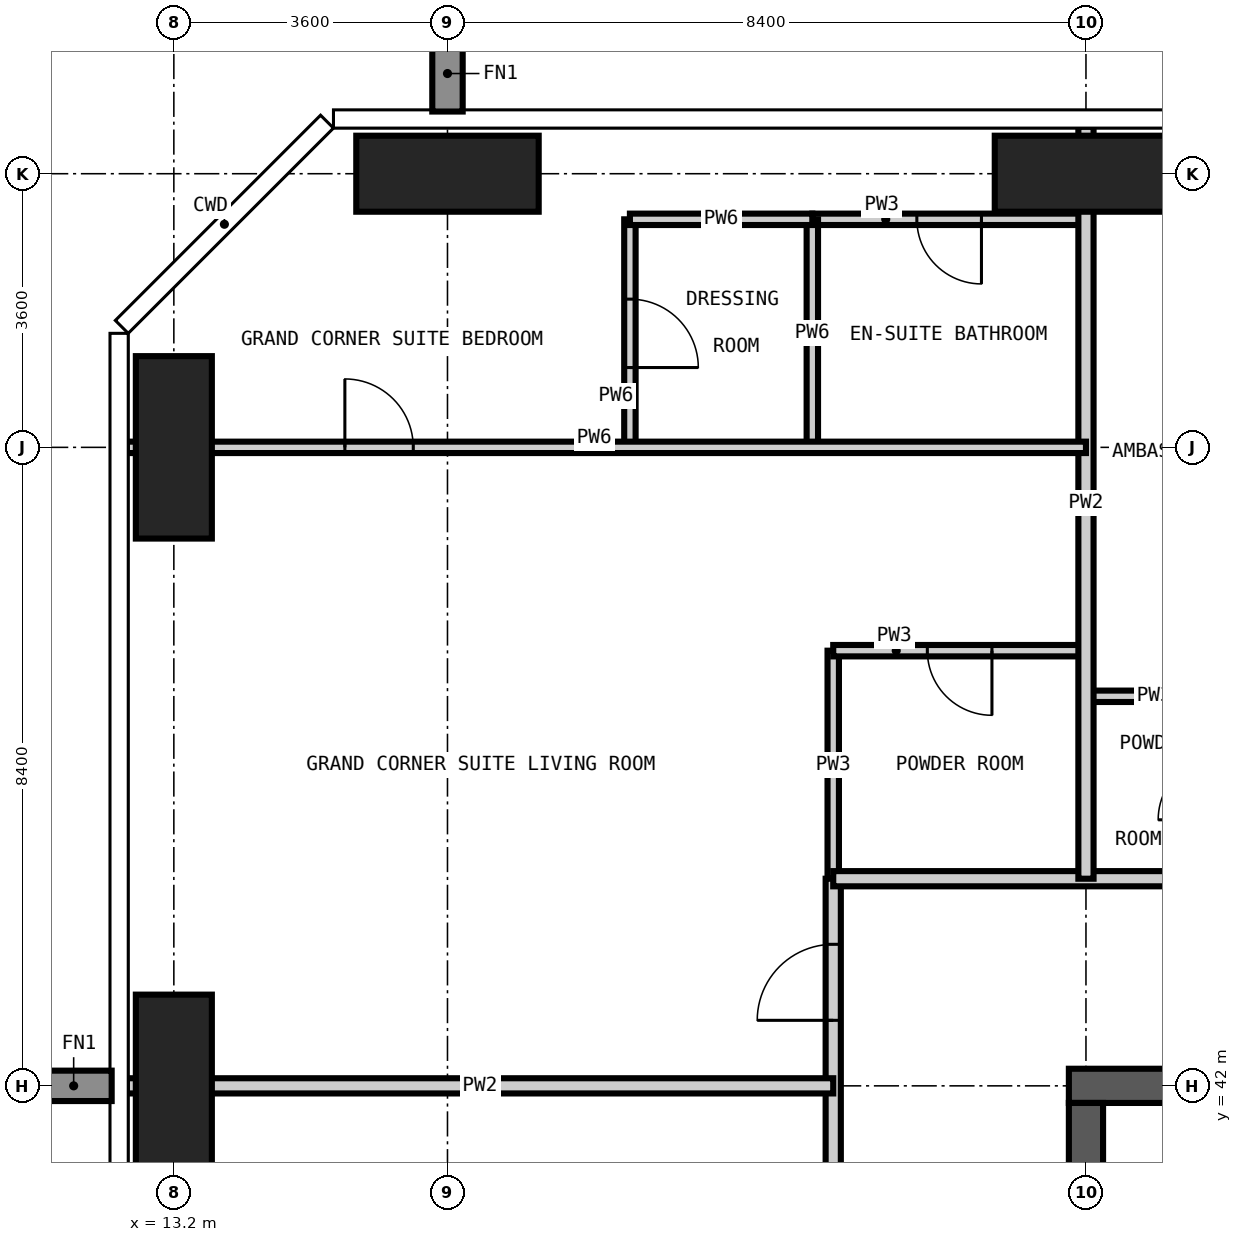
"""IFC4 building model, lengths in metres.
Left out: names, types, materials, properties, quantities, classifications, styles, units other than length and angle.
Written with IfcOpenShell. Run it as: python <this file> out.ifc"""

import sys

from ifc_helpers import new_model, si_unit, direction, frame, frame_2d, origin, origin_2d, place, context, subcontext, project, spatial, rectangle, extrude, element, fill, save


model = new_model("IFC4")
c1 = context("Model", 3, precision=1e-05, world=origin(), true_north=direction((0.0, 1.0)))
c2 = subcontext(c1, "Body", "Model", "MODEL_VIEW")
j1 = project(units=[si_unit("LENGTHUNIT", "METRE"), si_unit("PLANEANGLEUNIT", "RADIAN")], contexts=[c1])
p1 = place(None, origin())
s1 = spatial("IfcSite", under=j1, at=p1, CompositionType="ELEMENT")
p2 = place(p1, origin())
s2 = spatial("IfcBuilding", under=s1, at=p2, CompositionType="ELEMENT")
p3 = place(p2, frame((0.0, 0.0, 241.2)))
s3 = spatial("IfcBuildingStorey", under=s2, at=p3, CompositionType="ELEMENT", Elevation=241.2)
for number, where, z_axis, x_axis in (
    (1, (13.2, 42.0, -0.35), (0.0, 0.0, 1.0), (1.0, 0.0, 0.0)),
    (2, (13.2, 50.4, -0.35), (0.0, 0.0, 1.0), (1.0, 0.0, 0.0)),
):
    element("IfcColumn", number, at=place(p3, frame(where, z_axis=z_axis, x_axis=x_axis)), inside=s3, PredefinedType="COLUMN", context=c2, shape_type="SweptSolid", body=[
        extrude(rectangle(XDim=1.0, YDim=2.4, at=origin_2d()), origin(), (0.0, 0.0, 1.0), 3.9),
    ])
for number, where, z_axis, x_axis in (
    (3, (16.8, 54.0, -0.35), (0.0, 0.0, 1.0), (1.0, 0.0, 0.0)),
    (4, (25.2, 54.0, -0.35), (0.0, 0.0, 1.0), (1.0, 0.0, 0.0)),
):
    element("IfcColumn", number, at=place(p3, frame(where, z_axis=z_axis, x_axis=x_axis)), inside=s3, PredefinedType="COLUMN", context=c2, shape_type="SweptSolid", body=[
        extrude(rectangle(XDim=2.4, YDim=1.0, at=origin_2d()), origin(), (0.0, 0.0, 1.0), 3.9),
    ])
p4 = place(p3, frame((42.225, 42.0, -0.35), z_axis=(0.0, 0.0, 1.0), x_axis=(-1.0, 0.0, 0.0)))
e5 = element("IfcWall", 5, at=p4, inside=s3, PredefinedType="SHEAR", context=c2, shape_type="SweptSolid", body=[
    extrude(rectangle(XDim=17.25, YDim=0.45, at=frame_2d((8.625, 0.0))), origin(), (0.0, 0.0, 1.0), 3.9),
])
p5 = place(p4, frame((10.125, 0.0, 0.35)))
e6 = element("IfcOpeningElement", 6, at=p5, cuts=e5, PredefinedType="OPENING", context=c2, shape_type="SweptSolid", body=[
    extrude(rectangle(XDim=1.2, YDim=2.2, at=frame_2d((0.6, 1.1))), frame((0.0, 0.235, 0.0), z_axis=(0.0, -1.0, 0.0), x_axis=(1.0, 0.0, 0.0)), (0.0, 0.0, 1.0), 0.47),
])
p6 = place(p3, frame((25.2, 41.775, -0.35), z_axis=(0.0, 0.0, 1.0), x_axis=(0.0, -1.0, 0.0)))
e7 = element("IfcWall", 7, at=p6, inside=s3, PredefinedType="SHEAR", context=c2, shape_type="SweptSolid", body=[
    extrude(rectangle(XDim=24.75, YDim=0.45, at=frame_2d((12.375, 0.0))), origin(), (0.0, 0.0, 1.0), 3.9),
])
p7 = place(p6, frame((11.875, 0.0, 0.35)))
e8 = element("IfcOpeningElement", 8, at=p7, cuts=e7, PredefinedType="OPENING", context=c2, shape_type="SweptSolid", body=[
    extrude(rectangle(XDim=1.0, YDim=2.1, at=frame_2d((0.5, 1.05))), frame((0.0, 0.235, 0.0), z_axis=(0.0, -1.0, 0.0), x_axis=(1.0, 0.0, 0.0)), (0.0, 0.0, 1.0), 0.47),
])
p8 = place(p3, frame((21.875, 44.725, 0.0), z_axis=(0.0, 0.0, 1.0), x_axis=(0.0, 1.0, 0.0)))
e9 = element("IfcWall", 9, at=p8, inside=s3, PredefinedType="PARTITIONING", context=c2, shape_type="SweptSolid", body=[
    extrude(rectangle(XDim=3.0, YDim=0.15, at=frame_2d((1.5, 0.0))), origin(), (0.0, 0.0, 1.0), 3.55),
])
p9 = place(p3, frame((25.2, 47.125, 0.0), z_axis=(0.0, 0.0, 1.0), x_axis=(1.0, 0.0, 0.0)))
e10 = element("IfcWall", 10, at=p9, inside=s3, PredefinedType="PARTITIONING", context=c2, shape_type="SweptSolid", body=[
    extrude(rectangle(XDim=1.8, YDim=0.15, at=frame_2d((0.9, 0.0))), origin(), (0.0, 0.0, 1.0), 3.55),
])
p10 = place(p3, frame((21.875, 47.725, 0.0), z_axis=(0.0, 0.0, 1.0), x_axis=(1.0, 0.0, 0.0)))
e11 = element("IfcWall", 11, at=p10, inside=s3, PredefinedType="PARTITIONING", context=c2, shape_type="SweptSolid", body=[
    extrude(rectangle(XDim=3.325, YDim=0.15, at=frame_2d((1.663, 0.0))), origin(), (0.0, 0.0, 1.0), 3.55),
])
p11 = place(p10, frame((1.238, 0.0, 0.0)))
e12 = element("IfcOpeningElement", 12, at=p11, cuts=e11, PredefinedType="OPENING", context=c2, shape_type="SweptSolid", body=[
    extrude(rectangle(XDim=0.85, YDim=2.1, at=frame_2d((0.425, 1.05))), frame((0.0, 0.085, 0.0), z_axis=(0.0, -1.0, 0.0), x_axis=(1.0, 0.0, 0.0)), (0.0, 0.0, 1.0), 0.17),
])
p12 = place(p3, frame((21.6, 53.4, 0.0), z_axis=(0.0, 0.0, 1.0), x_axis=(1.0, 0.0, 0.0)))
e13 = element("IfcWall", 13, at=p12, inside=s3, PredefinedType="PARTITIONING", context=c2, shape_type="SweptSolid", body=[
    extrude(rectangle(XDim=3.6, YDim=0.15, at=frame_2d((1.8, 0.0))), origin(), (0.0, 0.0, 1.0), 3.55),
])
p13 = place(p12, frame((1.375, 0.0, 0.0)))
e14 = element("IfcOpeningElement", 14, at=p13, cuts=e13, PredefinedType="OPENING", context=c2, shape_type="SweptSolid", body=[
    extrude(rectangle(XDim=0.85, YDim=2.1, at=frame_2d((0.425, 1.05))), frame((0.0, 0.085, 0.0), z_axis=(0.0, -1.0, 0.0), x_axis=(1.0, 0.0, 0.0)), (0.0, 0.0, 1.0), 0.17),
])
p14 = place(p3, frame((21.875, 13.475, 0.0), z_axis=(0.0, 0.0, 1.0), x_axis=(0.0, 1.0, 0.0)))
e15 = element("IfcWall", 15, at=p14, inside=s3, PredefinedType="PARTITIONING", context=c2, shape_type="SweptSolid", body=[
    extrude(rectangle(XDim=31.25, YDim=0.2, at=frame_2d((15.625, 0.0))), origin(), (0.0, 0.0, 1.0), 3.55),
])
p15 = place(p14, frame((7.025, 0.0, 0.0)))
e16 = element("IfcOpeningElement", 16, at=p15, cuts=e15, PredefinedType="OPENING", context=c2, shape_type="SweptSolid", body=[
    extrude(rectangle(XDim=1.0, YDim=2.2, at=frame_2d((0.5, 1.1))), frame((0.0, 0.11, 0.0), z_axis=(0.0, -1.0, 0.0), x_axis=(1.0, 0.0, 0.0)), (0.0, 0.0, 1.0), 0.22),
])
p16 = place(p14, frame((15.425, 0.0, 0.0)))
e17 = element("IfcOpeningElement", 17, at=p16, cuts=e15, PredefinedType="OPENING", context=c2, shape_type="SweptSolid", body=[
    extrude(rectangle(XDim=1.0, YDim=2.2, at=frame_2d((0.5, 1.1))), frame((0.0, 0.11, 0.0), z_axis=(0.0, -1.0, 0.0), x_axis=(1.0, 0.0, 0.0)), (0.0, 0.0, 1.0), 0.22),
])
p17 = place(p14, frame((23.825, 0.0, 0.0)))
e18 = element("IfcOpeningElement", 18, at=p17, cuts=e15, PredefinedType="OPENING", context=c2, shape_type="SweptSolid", body=[
    extrude(rectangle(XDim=1.0, YDim=2.2, at=frame_2d((0.5, 1.1))), frame((0.0, 0.11, 0.0), z_axis=(0.0, -1.0, 0.0), x_axis=(1.0, 0.0, 0.0)), (0.0, 0.0, 1.0), 0.22),
])
p18 = place(p14, frame((1.162, 0.0, 0.0)))
e19 = element("IfcOpeningElement", 19, at=p18, cuts=e15, PredefinedType="OPENING", context=c2, shape_type="SweptSolid", body=[
    extrude(rectangle(XDim=1.0, YDim=2.2, at=frame_2d((0.5, 1.1))), frame((0.0, 0.11, 0.0), z_axis=(0.0, -1.0, 0.0), x_axis=(1.0, 0.0, 0.0)), (0.0, 0.0, 1.0), 0.22),
])
p19 = place(p14, frame((29.387, 0.0, 0.0)))
e20 = element("IfcOpeningElement", 20, at=p19, cuts=e15, PredefinedType="OPENING", context=c2, shape_type="SweptSolid", body=[
    extrude(rectangle(XDim=1.0, YDim=2.2, at=frame_2d((0.5, 1.1))), frame((0.0, 0.11, 0.0), z_axis=(0.0, -1.0, 0.0), x_axis=(1.0, 0.0, 0.0)), (0.0, 0.0, 1.0), 0.22),
])
p20 = place(p3, frame((21.875, 44.725, 0.0), z_axis=(0.0, 0.0, 1.0), x_axis=(1.0, 0.0, 0.0)))
e21 = element("IfcWall", 21, at=p20, inside=s3, PredefinedType="PARTITIONING", context=c2, shape_type="SweptSolid", body=[
    extrude(rectangle(XDim=22.25, YDim=0.2, at=frame_2d((11.125, 0.0))), origin(), (0.0, 0.0, 1.0), 3.55),
])
p21 = place(p20, frame((5.825, 0.0, 0.0)))
e22 = element("IfcOpeningElement", 22, at=p21, cuts=e21, PredefinedType="OPENING", context=c2, shape_type="SweptSolid", body=[
    extrude(rectangle(XDim=1.0, YDim=2.2, at=frame_2d((0.5, 1.1))), frame((0.0, 0.11, 0.0), z_axis=(0.0, -1.0, 0.0), x_axis=(1.0, 0.0, 0.0)), (0.0, 0.0, 1.0), 0.22),
])
p22 = place(p20, frame((17.525, 0.0, 0.0)))
e23 = element("IfcOpeningElement", 23, at=p22, cuts=e21, PredefinedType="OPENING", context=c2, shape_type="SweptSolid", body=[
    extrude(rectangle(XDim=1.0, YDim=2.1, at=frame_2d((0.5, 1.05))), frame((0.0, 0.11, 0.0), z_axis=(0.0, -1.0, 0.0), x_axis=(1.0, 0.0, 0.0)), (0.0, 0.0, 1.0), 0.22),
])
p23 = place(p3, frame((25.2, 44.725, 0.0), z_axis=(0.0, 0.0, 1.0), x_axis=(0.0, 1.0, 0.0)))
e24 = element("IfcWall", 24, at=p23, inside=s3, PredefinedType="PARTITIONING", context=c2, shape_type="SweptSolid", body=[
    extrude(rectangle(XDim=9.893, YDim=0.2, at=frame_2d((4.946, 0.0))), origin(), (0.0, 0.0, 1.0), 3.55),
])
p24 = place(p3, frame((12.582, 42.0, 0.0), z_axis=(0.0, 0.0, 1.0), x_axis=(1.0, 0.0, 0.0)))
e25 = element("IfcWall", 25, at=p24, inside=s3, PredefinedType="PARTITIONING", context=c2, shape_type="SweptSolid", body=[
    extrude(rectangle(XDim=9.293, YDim=0.2, at=frame_2d((4.646, 0.0))), origin(), (0.0, 0.0, 1.0), 3.55),
])
p25 = place(p3, frame((19.2, 50.4, 0.0), z_axis=(0.0, 0.0, 1.0), x_axis=(0.0, 1.0, 0.0)))
e26 = element("IfcWall", 26, at=p25, inside=s3, PredefinedType="PARTITIONING", context=c2, shape_type="SweptSolid", body=[
    extrude(rectangle(XDim=3.0, YDim=0.15, at=frame_2d((1.5, 0.0))), origin(), (0.0, 0.0, 1.0), 3.55),
])
p26 = place(p25, frame((1.05, 0.0, 0.0)))
e27 = element("IfcOpeningElement", 27, at=p26, cuts=e26, PredefinedType="OPENING", context=c2, shape_type="SweptSolid", body=[
    extrude(rectangle(XDim=0.9, YDim=2.1, at=frame_2d((0.45, 1.05))), frame((0.0, 0.085, 0.0), z_axis=(0.0, -1.0, 0.0), x_axis=(1.0, 0.0, 0.0)), (0.0, 0.0, 1.0), 0.17),
])
p27 = place(p3, frame((21.6, 50.4, 0.0), z_axis=(0.0, 0.0, 1.0), x_axis=(0.0, 1.0, 0.0)))
e28 = element("IfcWall", 28, at=p27, inside=s3, PredefinedType="PARTITIONING", context=c2, shape_type="SweptSolid", body=[
    extrude(rectangle(XDim=3.0, YDim=0.15, at=frame_2d((1.5, 0.0))), origin(), (0.0, 0.0, 1.0), 3.55),
])
p28 = place(p3, frame((12.582, 50.4, 0.0), z_axis=(0.0, 0.0, 1.0), x_axis=(1.0, 0.0, 0.0)))
e29 = element("IfcWall", 29, at=p28, inside=s3, PredefinedType="PARTITIONING", context=c2, shape_type="SweptSolid", body=[
    extrude(rectangle(XDim=12.618, YDim=0.15, at=frame_2d((6.309, 0.0))), origin(), (0.0, 0.0, 1.0), 3.55),
])
p29 = place(p28, frame((2.868, 0.0, 0.0)))
e30 = element("IfcOpeningElement", 30, at=p29, cuts=e29, PredefinedType="OPENING", context=c2, shape_type="SweptSolid", body=[
    extrude(rectangle(XDim=0.9, YDim=2.1, at=frame_2d((0.45, 1.05))), frame((0.0, 0.085, 0.0), z_axis=(0.0, -1.0, 0.0), x_axis=(1.0, 0.0, 0.0)), (0.0, 0.0, 1.0), 0.17),
])
p30 = place(p3, frame((19.2, 53.4, 0.0), z_axis=(0.0, 0.0, 1.0), x_axis=(1.0, 0.0, 0.0)))
e31 = element("IfcWall", 31, at=p30, inside=s3, PredefinedType="PARTITIONING", context=c2, shape_type="SweptSolid", body=[
    extrude(rectangle(XDim=2.4, YDim=0.15, at=frame_2d((1.2, 0.0))), origin(), (0.0, 0.0, 1.0), 3.55),
])
p31 = place(p19, origin())
e32 = element("IfcDoor", 32, at=p31, inside=s3, OperationType="SINGLE_SWING_LEFT", PredefinedType="DOOR", context=c2, shape_type="SweptSolid", body=[
    extrude(rectangle(XDim=1.0, YDim=2.2, at=frame_2d((0.5, 1.1))), frame((0.0, 0.025, 0.0), z_axis=(0.0, -1.0, 0.0), x_axis=(1.0, 0.0, 0.0)), (0.0, 0.0, 1.0), 0.05),
])
fill(e20, e32)
p32 = place(p11, frame((0.85, 0.0, 0.0), z_axis=(0.0, 0.0, 1.0), x_axis=(-1.0, 0.0, 0.0)))
e33 = element("IfcDoor", 33, at=p32, inside=s3, OperationType="SINGLE_SWING_LEFT", PredefinedType="DOOR", context=c2, shape_type="SweptSolid", body=[
    extrude(rectangle(XDim=0.85, YDim=2.1, at=frame_2d((0.425, 1.05))), frame((0.0, 0.025, 0.0), z_axis=(0.0, -1.0, 0.0), x_axis=(1.0, 0.0, 0.0)), (0.0, 0.0, 1.0), 0.05),
])
fill(e12, e33)
p33 = place(p29, origin())
e34 = element("IfcDoor", 34, at=p33, inside=s3, OperationType="SINGLE_SWING_LEFT", PredefinedType="DOOR", context=c2, shape_type="SweptSolid", body=[
    extrude(rectangle(XDim=0.9, YDim=2.1, at=frame_2d((0.45, 1.05))), frame((0.0, 0.025, 0.0), z_axis=(0.0, -1.0, 0.0), x_axis=(1.0, 0.0, 0.0)), (0.0, 0.0, 1.0), 0.05),
])
fill(e30, e34)
p34 = place(p13, frame((0.85, 0.0, 0.0), z_axis=(0.0, 0.0, 1.0), x_axis=(-1.0, 0.0, 0.0)))
e35 = element("IfcDoor", 35, at=p34, inside=s3, OperationType="SINGLE_SWING_LEFT", PredefinedType="DOOR", context=c2, shape_type="SweptSolid", body=[
    extrude(rectangle(XDim=0.85, YDim=2.1, at=frame_2d((0.425, 1.05))), frame((0.0, 0.025, 0.0), z_axis=(0.0, -1.0, 0.0), x_axis=(1.0, 0.0, 0.0)), (0.0, 0.0, 1.0), 0.05),
])
fill(e14, e35)
p35 = place(p26, frame((0.9, 0.0, 0.0), z_axis=(0.0, 0.0, 1.0), x_axis=(-1.0, 0.0, 0.0)))
e36 = element("IfcDoor", 36, at=p35, inside=s3, OperationType="SINGLE_SWING_RIGHT", PredefinedType="DOOR", context=c2, shape_type="SweptSolid", body=[
    extrude(rectangle(XDim=0.9, YDim=2.1, at=frame_2d((0.45, 1.05))), frame((0.0, 0.025, 0.0), z_axis=(0.0, -1.0, 0.0), x_axis=(1.0, 0.0, 0.0)), (0.0, 0.0, 1.0), 0.05),
])
fill(e27, e36)
save(model, sys.argv[1])
